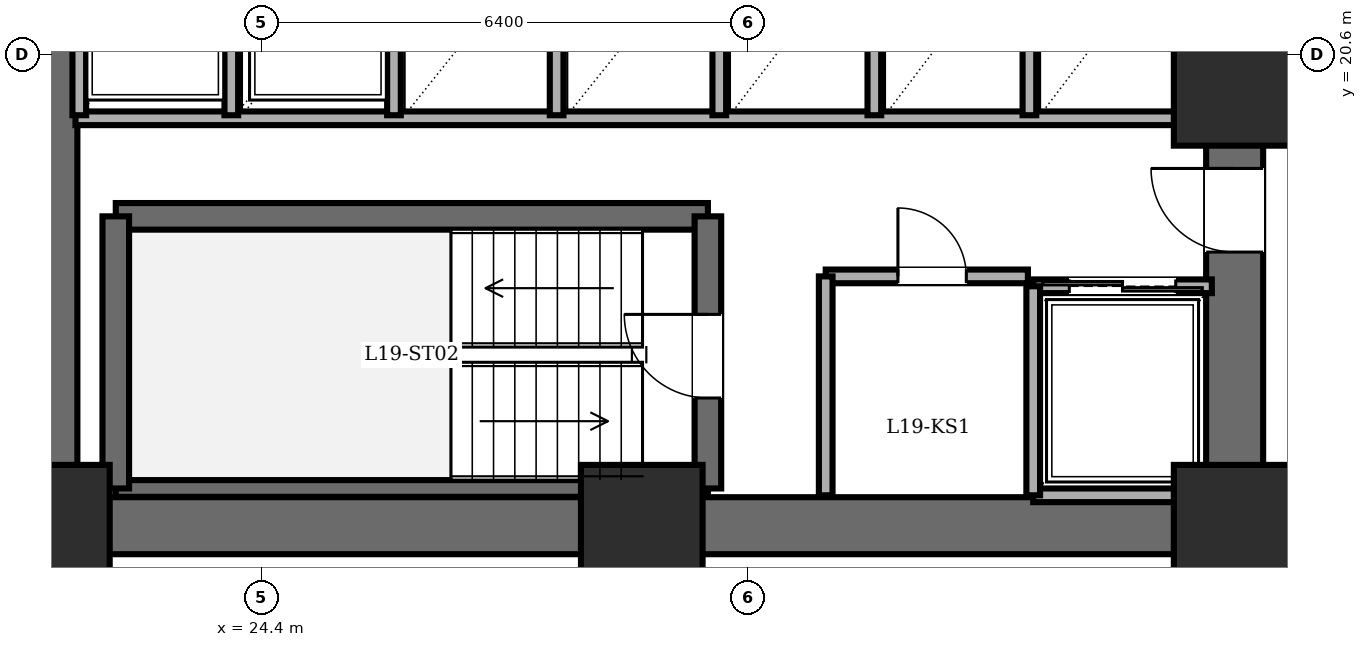
"""IFC4 building model, lengths in metres.
Left out: names, types, materials, properties, quantities, classifications, styles, units other than length and angle.
Written with IfcOpenShell. Run it as: python <this file> out.ifc"""

import sys

from ifc_helpers import new_model, si_unit, direction, frame, frame_2d, origin, origin_2d, place, context, subcontext, project, spatial, rectangle, extrude, element, fill, save


model = new_model("IFC4")
c1 = context("Model", 3, precision=1e-05, world=origin(), true_north=direction((0.0, 1.0)))
c2 = subcontext(c1, "Body", "Model", "MODEL_VIEW")
j1 = project(units=[si_unit("LENGTHUNIT", "METRE"), si_unit("PLANEANGLEUNIT", "RADIAN")], contexts=[c1])
p1 = place(None, origin())
s1 = spatial("IfcSite", under=j1, at=p1, CompositionType="ELEMENT")
p2 = place(p1, origin())
s2 = spatial("IfcBuilding", under=s1, at=p2, CompositionType="ELEMENT")
p3 = place(p2, frame((0.0, 0.0, 72.0)))
s3 = spatial("IfcBuildingStorey", under=s2, at=p3, CompositionType="ELEMENT", Elevation=72.0)
for number, where, z_axis, x_axis in (
    (1, (21.6, 14.4, 0.0), (0.0, 0.0, 1.0), (1.0, 0.0, 0.0)),
    (2, (29.4, 14.4, 0.0), (0.0, 0.0, 1.0), (1.0, 0.0, 0.0)),
    (3, (37.2, 14.4, 0.0), (0.0, 0.0, 1.0), (1.0, 0.0, 0.0)),
    (4, (37.2, 20.2, 0.0), (0.0, 0.0, 1.0), (1.0, 0.0, 0.0)),
):
    element("IfcColumn", number, at=place(p3, frame(where, z_axis=z_axis, x_axis=x_axis)), inside=s3, PredefinedType="COLUMN", context=c2, shape_type="SweptSolid", body=[
        extrude(rectangle(XDim=1.6, YDim=1.6, at=origin_2d()), origin(), (0.0, 0.0, 1.0), 3.6),
    ])
p4 = place(p3, frame((21.6, 14.4, 0.0), z_axis=(0.0, 0.0, 1.0), x_axis=(0.0, 1.0, 0.0)))
e5 = element("IfcWall", 5, at=p4, inside=s3, PredefinedType="SHEAR", context=c2, shape_type="SweptSolid", body=[
    extrude(rectangle(XDim=19.2, YDim=0.75, at=frame_2d((9.6, 0.0))), origin(), (0.0, 0.0, 1.0), 3.36),
])
p5 = place(p3, frame((37.2, 14.4, 0.0), z_axis=(0.0, 0.0, 1.0), x_axis=(-1.0, 0.0, 0.0)))
e6 = element("IfcWall", 6, at=p5, inside=s3, PredefinedType="SHEAR", context=c2, shape_type="SweptSolid", body=[
    extrude(rectangle(XDim=15.6, YDim=0.75, at=frame_2d((7.8, 0.0))), origin(), (0.0, 0.0, 1.0), 3.36),
])
p6 = place(p3, frame((37.2, 14.4, 0.0), z_axis=(0.0, 0.0, 1.0), x_axis=(0.0, 1.0, 0.0)))
e7 = element("IfcWall", 7, at=p6, inside=s3, PredefinedType="SHEAR", context=c2, shape_type="SweptSolid", body=[
    extrude(rectangle(XDim=19.2, YDim=0.75, at=frame_2d((9.6, 0.0))), origin(), (0.0, 0.0, 1.0), 3.36),
])
p7 = place(p6, frame((15.8, 0.0, 0.0)))
e8 = element("IfcOpeningElement", 8, at=p7, cuts=e7, PredefinedType="OPENING", context=c2, shape_type="SweptSolid", body=[
    extrude(rectangle(XDim=1.15, YDim=2.15, at=frame_2d((0.575, 1.075))), frame((0.0, 0.385, 0.0), z_axis=(0.0, -1.0, 0.0), x_axis=(1.0, 0.0, 0.0)), (0.0, 0.0, 1.0), 0.77),
])
p8 = place(p6, frame((3.6, 0.0, 0.0)))
e9 = element("IfcOpeningElement", 9, at=p8, cuts=e7, PredefinedType="OPENING", context=c2, shape_type="SweptSolid", body=[
    extrude(rectangle(XDim=1.1, YDim=2.15, at=frame_2d((0.55, 1.075))), frame((0.0, 0.385, 0.0), z_axis=(0.0, -1.0, 0.0), x_axis=(1.0, 0.0, 0.0)), (0.0, 0.0, 1.0), 0.77),
])
p9 = place(p6, frame((8.6, 0.0, 0.0)))
e10 = element("IfcOpeningElement", 10, at=p9, cuts=e7, PredefinedType="OPENING", context=c2, shape_type="SweptSolid", body=[
    extrude(rectangle(XDim=1.3, YDim=2.2, at=frame_2d((0.65, 1.1))), frame((0.0, 0.385, 0.0), z_axis=(0.0, -1.0, 0.0), x_axis=(1.0, 0.0, 0.0)), (0.0, 0.0, 1.0), 0.77),
])
p10 = place(p3, frame((22.48, 18.47, 0.0), z_axis=(0.0, 0.0, 1.0), x_axis=(1.0, 0.0, 0.0)))
e11 = element("IfcWall", 11, at=p10, inside=s3, PredefinedType="SOLIDWALL", context=c2, shape_type="SweptSolid", body=[
    extrude(rectangle(XDim=7.79, YDim=0.35, at=frame_2d((3.895, 0.0))), origin(), (0.0, 0.0, 1.0), 3.36),
])
p11 = place(p3, frame((22.48, 14.89, 0.0), z_axis=(0.0, 0.0, 1.0), x_axis=(1.0, 0.0, 0.0)))
e12 = element("IfcWall", 12, at=p11, inside=s3, PredefinedType="PARTITIONING", context=c2, shape_type="SweptSolid", body=[
    extrude(rectangle(XDim=7.79, YDim=0.22, at=frame_2d((3.895, 0.0))), origin(), (0.0, 0.0, 1.0), 3.36),
])
p12 = place(p3, frame((22.48, 14.89, 0.0), z_axis=(0.0, 0.0, 1.0), x_axis=(0.0, 1.0, 0.0)))
e13 = element("IfcWall", 13, at=p12, inside=s3, PredefinedType="SOLIDWALL", context=c2, shape_type="SweptSolid", body=[
    extrude(rectangle(XDim=3.58, YDim=0.35, at=frame_2d((1.79, 0.0))), origin(), (0.0, 0.0, 1.0), 3.36),
])
p13 = place(p3, frame((30.27, 14.89, 0.0), z_axis=(0.0, 0.0, 1.0), x_axis=(0.0, 1.0, 0.0)))
e14 = element("IfcWall", 14, at=p13, inside=s3, PredefinedType="SOLIDWALL", context=c2, shape_type="SweptSolid", body=[
    extrude(rectangle(XDim=3.58, YDim=0.35, at=frame_2d((1.79, 0.0))), origin(), (0.0, 0.0, 1.0), 3.36),
])
p14 = place(p13, frame((1.19, 0.0, 0.0)))
e15 = element("IfcOpeningElement", 15, at=p14, cuts=e14, PredefinedType="OPENING", context=c2, shape_type="SweptSolid", body=[
    extrude(rectangle(XDim=1.1, YDim=2.15, at=frame_2d((0.55, 1.075))), frame((0.0, 0.185, 0.0), z_axis=(0.0, -1.0, 0.0), x_axis=(1.0, 0.0, 0.0)), (0.0, 0.0, 1.0), 0.37),
])
p15 = place(p3, frame((21.95, 19.76, 0.0), z_axis=(0.0, 0.0, 1.0), x_axis=(1.0, 0.0, 0.0)))
e16 = element("IfcWall", 16, at=p15, inside=s3, PredefinedType="PARTITIONING", context=c2, shape_type="SweptSolid", body=[
    extrude(rectangle(XDim=14.87, YDim=0.18, at=frame_2d((7.435, 0.0))), origin(), (0.0, 0.0, 1.0), 3.36),
])
p16 = place(p3, frame((31.82, 17.68, 0.0), z_axis=(0.0, 0.0, 1.0), x_axis=(1.0, 0.0, 0.0)))
e17 = element("IfcWall", 17, at=p16, inside=s3, PredefinedType="PARTITIONING", context=c2, shape_type="SweptSolid", body=[
    extrude(rectangle(XDim=2.66, YDim=0.18, at=frame_2d((1.33, 0.0))), origin(), (0.0, 0.0, 1.0), 3.36),
])
p17 = place(p16, frame((0.95, 0.0, 0.0)))
e18 = element("IfcOpeningElement", 18, at=p17, cuts=e17, PredefinedType="OPENING", context=c2, shape_type="SweptSolid", body=[
    extrude(rectangle(XDim=0.9, YDim=2.05, at=frame_2d((0.45, 1.025))), frame((0.0, 0.1, 0.0), z_axis=(0.0, -1.0, 0.0), x_axis=(1.0, 0.0, 0.0)), (0.0, 0.0, 1.0), 0.2),
])
p18 = place(p3, frame((31.82, 14.8, 0.0), z_axis=(0.0, 0.0, 1.0), x_axis=(0.0, 1.0, 0.0)))
e19 = element("IfcWall", 19, at=p18, inside=s3, PredefinedType="PARTITIONING", context=c2, shape_type="SweptSolid", body=[
    extrude(rectangle(XDim=2.88, YDim=0.18, at=frame_2d((1.44, 0.0))), origin(), (0.0, 0.0, 1.0), 3.36),
])
p19 = place(p3, frame((34.55, 17.55, 0.0), z_axis=(0.0, 0.0, 1.0), x_axis=(1.0, 0.0, 0.0)))
e20 = element("IfcWall", 20, at=p19, inside=s3, PredefinedType="PARTITIONING", context=c2, shape_type="SweptSolid", body=[
    extrude(rectangle(XDim=2.35, YDim=0.18, at=frame_2d((1.175, 0.0))), origin(), (0.0, 0.0, 1.0), 3.36),
])
p20 = place(p19, frame((0.475, 0.0, 0.0)))
e21 = element("IfcOpeningElement", 21, at=p20, cuts=e20, PredefinedType="OPENING", context=c2, shape_type="SweptSolid", body=[
    extrude(rectangle(XDim=1.4, YDim=2.3, at=frame_2d((0.7, 1.15))), frame((0.0, 0.1, 0.0), z_axis=(0.0, -1.0, 0.0), x_axis=(1.0, 0.0, 0.0)), (0.0, 0.0, 1.0), 0.2),
])
p21 = place(p3, frame((36.9, 14.8, 0.0), z_axis=(0.0, 0.0, 1.0), x_axis=(-1.0, 0.0, 0.0)))
e22 = element("IfcWall", 22, at=p21, inside=s3, PredefinedType="PARTITIONING", context=c2, shape_type="SweptSolid", body=[
    extrude(rectangle(XDim=2.35, YDim=0.18, at=frame_2d((1.175, 0.0))), origin(), (0.0, 0.0, 1.0), 3.36),
])
p22 = place(p3, frame((34.55, 17.55, 0.0), z_axis=(0.0, 0.0, 1.0), x_axis=(0.0, -1.0, 0.0)))
e23 = element("IfcWall", 23, at=p22, inside=s3, PredefinedType="PARTITIONING", context=c2, shape_type="SweptSolid", body=[
    extrude(rectangle(XDim=2.75, YDim=0.18, at=frame_2d((1.375, 0.0))), origin(), (0.0, 0.0, 1.0), 3.36),
])
for number, where, z_axis, x_axis in (
    (24, (24.0, 19.8, 0.0), (0.0, 0.0, 1.0), (0.0, 1.0, 0.0)),
    (25, (22.0, 22.3, 0.0), (0.0, 0.0, 1.0), (0.0, -1.0, 0.0)),
    (26, (26.14, 19.8, 0.0), (0.0, 0.0, 1.0), (0.0, 1.0, 0.0)),
    (27, (28.28, 19.8, 0.0), (0.0, 0.0, 1.0), (0.0, 1.0, 0.0)),
    (28, (30.42, 19.8, 0.0), (0.0, 0.0, 1.0), (0.0, 1.0, 0.0)),
    (29, (32.46, 19.8, 0.0), (0.0, 0.0, 1.0), (0.0, 1.0, 0.0)),
    (30, (34.5, 19.8, 0.0), (0.0, 0.0, 1.0), (0.0, 1.0, 0.0)),
    (31, (36.54, 19.8, 0.0), (0.0, 0.0, 1.0), (0.0, 1.0, 0.0)),
):
    element("IfcWall", number, at=place(p3, frame(where, z_axis=z_axis, x_axis=x_axis)), inside=s3, PredefinedType="PARTITIONING", context=c2, shape_type="SweptSolid", body=[
        extrude(rectangle(XDim=2.5, YDim=0.18, at=frame_2d((1.25, 0.0))), origin(), (0.0, 0.0, 1.0), 3.36),
    ])
p23 = place(p14, origin())
e32 = element("IfcDoor", 32, at=p23, inside=s3, OperationType="SINGLE_SWING_RIGHT", PredefinedType="DOOR", context=c2, shape_type="SweptSolid", body=[
    extrude(rectangle(XDim=1.1, YDim=2.15, at=frame_2d((0.55, 1.075))), frame((0.0, 0.025, 0.0), z_axis=(0.0, -1.0, 0.0), x_axis=(1.0, 0.0, 0.0)), (0.0, 0.0, 1.0), 0.05),
])
fill(e15, e32)
p24 = place(p8, origin())
e33 = element("IfcDoor", 33, at=p24, inside=s3, OperationType="SINGLE_SWING_RIGHT", PredefinedType="DOOR", context=c2, shape_type="SweptSolid", body=[
    extrude(rectangle(XDim=1.1, YDim=2.15, at=frame_2d((0.55, 1.075))), frame((0.0, 0.025, 0.0), z_axis=(0.0, -1.0, 0.0), x_axis=(1.0, 0.0, 0.0)), (0.0, 0.0, 1.0), 0.05),
])
fill(e9, e33)
p25 = place(p17, origin())
e34 = element("IfcDoor", 34, at=p25, inside=s3, OperationType="SINGLE_SWING_LEFT", PredefinedType="DOOR", context=c2, shape_type="SweptSolid", body=[
    extrude(rectangle(XDim=0.9, YDim=2.05, at=frame_2d((0.45, 1.025))), frame((0.0, 0.025, 0.0), z_axis=(0.0, -1.0, 0.0), x_axis=(1.0, 0.0, 0.0)), (0.0, 0.0, 1.0), 0.05),
])
fill(e18, e34)
p26 = place(p20, origin())
e35 = element("IfcDoor", 35, at=p26, inside=s3, OperationType="DOUBLE_DOOR_SLIDING", PredefinedType="DOOR", context=c2, shape_type="SweptSolid", body=[
    extrude(rectangle(XDim=1.4, YDim=2.3, at=frame_2d((0.7, 1.15))), frame((0.0, 0.025, 0.0), z_axis=(0.0, -1.0, 0.0), x_axis=(1.0, 0.0, 0.0)), (0.0, 0.0, 1.0), 0.05),
])
fill(e21, e35)
save(model, sys.argv[1])
